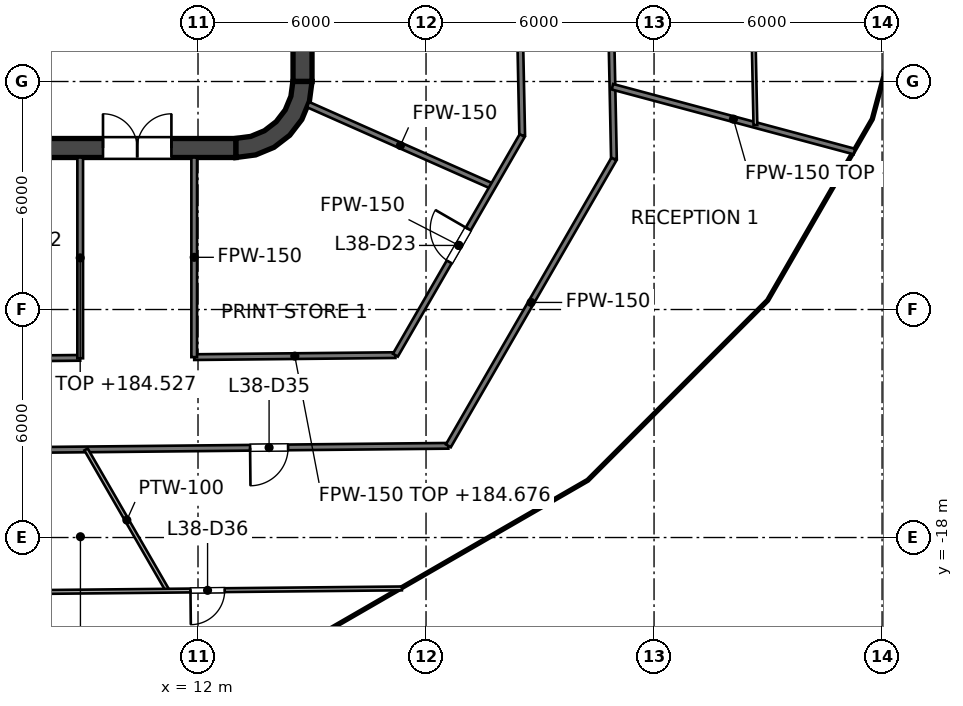
"""IFC4 building model, lengths in metres.
Left out: names, types, materials, properties, quantities, classifications, styles, units other than length and angle.
Written with IfcOpenShell. Run it as: python <this file> out.ifc"""

import sys

from ifc_helpers import new_model, si_unit, direction, frame, frame_2d, origin, place, context, subcontext, project, spatial, polyline, rectangle, outline, extrude, element, fill, save


model = new_model("IFC4")
c1 = context("Model", 3, precision=1e-05, world=origin(), true_north=direction((0.0, 1.0)))
c2 = subcontext(c1, "Body", "Model", "MODEL_VIEW")
j1 = project(units=[si_unit("LENGTHUNIT", "METRE"), si_unit("PLANEANGLEUNIT", "RADIAN")], contexts=[c1])
p1 = place(None, origin())
s1 = spatial("IfcSite", under=j1, at=p1, CompositionType="ELEMENT")
p2 = place(p1, origin())
s2 = spatial("IfcBuilding", under=s1, at=p2, CompositionType="ELEMENT")
p3 = place(p2, frame((0.0, 0.0, 181.6)))
s3 = spatial("IfcBuildingStorey", under=s2, at=p3, CompositionType="ELEMENT", Elevation=181.6)
p4 = place(p3, frame((-13.0, -7.75, 0.0), z_axis=(0.0, 0.0, 1.0), x_axis=(1.0, 0.0, 0.0)))
e1 = element("IfcWall", 1, at=p4, inside=s3, PredefinedType="SHEAR", context=c2, shape_type="SweptSolid", body=[
    extrude(rectangle(XDim=26.0, YDim=0.5, at=frame_2d((13.0, 0.0))), origin(), (0.0, 0.0, 1.0), 4.0),
])
p5 = place(p4, frame((1.7, 0.0, 0.0)))
e2 = element("IfcOpeningElement", 2, at=p5, cuts=e1, PredefinedType="OPENING", context=c2, shape_type="SweptSolid", body=[
    extrude(rectangle(XDim=1.8, YDim=2.1, at=frame_2d((0.9, 1.05))), frame((0.0, 0.25, 0.0), z_axis=(0.0, -1.0, 0.0), x_axis=(1.0, 0.0, 0.0)), (0.0, 0.0, 1.0), 0.5),
])
p6 = place(p4, frame((22.5, 0.0, 0.0)))
e3 = element("IfcOpeningElement", 3, at=p6, cuts=e1, PredefinedType="OPENING", context=c2, shape_type="SweptSolid", body=[
    extrude(rectangle(XDim=1.8, YDim=2.1, at=frame_2d((0.9, 1.05))), frame((0.0, 0.25, 0.0), z_axis=(0.0, -1.0, 0.0), x_axis=(1.0, 0.0, 0.0)), (0.0, 0.0, 1.0), 0.5),
])
p7 = place(p3, frame((14.75, -6.0, 0.0), z_axis=(0.0, 0.0, 1.0), x_axis=(0.0, 1.0, 0.0)))
e4 = element("IfcWall", 4, at=p7, inside=s3, PredefinedType="SHEAR", context=c2, shape_type="SweptSolid", body=[
    extrude(rectangle(XDim=12.0, YDim=0.5, at=frame_2d((6.0, 0.0))), origin(), (0.0, 0.0, 1.0), 4.0),
])
p8 = place(p3, origin())
e5 = element("IfcWall", 5, at=p8, inside=s3, PredefinedType="SHEAR", context=c2, shape_type="SweptSolid", body=[
    extrude(outline(polyline([(15.0, -6.0), (14.496, -6.0), (14.445, -6.387), (14.295, -6.748), (14.058, -7.058), (13.748, -7.295), (13.387, -7.445), (13.0, -7.496), (13.0, -8.0), (13.518, -7.932), (14.0, -7.732), (14.414, -7.414), (14.732, -7.0), (14.932, -6.518), (15.0, -6.0)])), origin(), (0.0, 0.0, 1.0), 4.0),
])
p9 = place(p3, frame((9.0, -6.6, 0.0), z_axis=(0.0, 0.0, 1.0), x_axis=(0.0, 1.0, 0.0)))
e6 = element("IfcWall", 6, at=p9, inside=s3, PredefinedType="SOLIDWALL", context=c2, shape_type="SweptSolid", body=[
    extrude(rectangle(XDim=2.5, YDim=0.25, at=frame_2d((1.25, 0.0))), origin(), (0.0, 0.0, 1.0), 3.85),
])
p10 = place(p9, frame((0.65, 0.0, 0.0)))
e7 = element("IfcOpeningElement", 7, at=p10, cuts=e6, PredefinedType="OPENING", context=c2, shape_type="SweptSolid", body=[
    extrude(rectangle(XDim=1.2, YDim=2.1, at=frame_2d((0.6, 1.05))), frame((0.0, 0.125, 0.0), z_axis=(0.0, -1.0, 0.0), x_axis=(1.0, 0.0, 0.0)), (0.0, 0.0, 1.0), 0.25),
])
p11 = place(p3, frame((-9.125, -7.05, 0.0), z_axis=(0.0, 0.0, 1.0), x_axis=(1.0, 0.0, 0.0)))
e8 = element("IfcWall", 8, at=p11, inside=s3, PredefinedType="SOLIDWALL", context=c2, shape_type="SweptSolid", body=[
    extrude(rectangle(XDim=18.25, YDim=0.9, at=frame_2d((9.125, 0.0))), origin(), (0.0, 0.0, 1.0), 3.85),
])
p12 = place(p3, frame((11.8, -7.5, 0.0), z_axis=(0.0, 0.0, 1.0), x_axis=(0.0, 1.0, 0.0)))
e9 = element("IfcWall", 9, at=p12, inside=s3, PredefinedType="SOLIDWALL", context=c2, shape_type="SweptSolid", body=[
    extrude(rectangle(XDim=15.0, YDim=0.4, at=frame_2d((7.5, 0.0))), origin(), (0.0, 0.0, 1.0), 3.85),
])
p13 = place(p12, frame((11.3, 0.0, 0.0)))
e10 = element("IfcOpeningElement", 10, at=p13, cuts=e9, PredefinedType="OPENING", context=c2, shape_type="SweptSolid", body=[
    extrude(rectangle(XDim=1.1, YDim=2.1, at=frame_2d((0.55, 1.05))), frame((0.0, 0.2, 0.0), z_axis=(0.0, -1.0, 0.0), x_axis=(1.0, 0.0, 0.0)), (0.0, 0.0, 1.0), 0.4),
])
p14 = place(p12, frame((8.4, 0.0, 0.0)))
e11 = element("IfcOpeningElement", 11, at=p14, cuts=e9, PredefinedType="OPENING", context=c2, shape_type="SweptSolid", body=[
    extrude(rectangle(XDim=1.1, YDim=2.1, at=frame_2d((0.55, 1.05))), frame((0.0, 0.2, 0.0), z_axis=(0.0, -1.0, 0.0), x_axis=(1.0, 0.0, 0.0)), (0.0, 0.0, 1.0), 0.4),
])
p15 = place(p12, frame((5.5, 0.0, 0.0)))
e12 = element("IfcOpeningElement", 12, at=p15, cuts=e9, PredefinedType="OPENING", context=c2, shape_type="SweptSolid", body=[
    extrude(rectangle(XDim=1.1, YDim=2.1, at=frame_2d((0.55, 1.05))), frame((0.0, 0.2, 0.0), z_axis=(0.0, -1.0, 0.0), x_axis=(1.0, 0.0, 0.0)), (0.0, 0.0, 1.0), 0.4),
])
p16 = place(p12, frame((13.697, 0.0, 0.0)))
e13 = element("IfcOpeningElement", 13, at=p16, cuts=e9, PredefinedType="OPENING", context=c2, shape_type="SweptSolid", body=[
    extrude(rectangle(XDim=0.9, YDim=2.1, at=frame_2d((0.45, 1.05))), frame((0.0, 0.2, 0.0), z_axis=(0.0, -1.0, 0.0), x_axis=(1.0, 0.0, 0.0)), (0.0, 0.0, 1.0), 0.4),
])
p17 = place(p12, frame((0.403, 0.0, 0.0)))
e14 = element("IfcOpeningElement", 14, at=p17, cuts=e9, PredefinedType="OPENING", context=c2, shape_type="SweptSolid", body=[
    extrude(rectangle(XDim=0.9, YDim=2.1, at=frame_2d((0.45, 1.05))), frame((0.0, 0.2, 0.0), z_axis=(0.0, -1.0, 0.0), x_axis=(1.0, 0.0, 0.0)), (0.0, 0.0, 1.0), 0.4),
])
e15 = element("IfcWall", 15, at=p8, inside=s3, PredefinedType="SOLIDWALL", context=c2, shape_type="SweptSolid", body=[
    extrude(outline(polyline([(12.0, -5.675), (12.0, -5.925), (14.25, -5.925), (14.5, -5.925), (14.5, -5.675), (14.5, -3.025), (14.5, -2.775), (14.5, -0.125), (14.5, 0.125), (14.5, 2.775), (14.5, 3.025), (14.5, 5.675), (14.5, 5.925), (14.25, 5.925), (12.0, 5.925), (12.0, 5.675), (14.25, 5.675), (14.25, 3.025), (12.0, 3.025), (12.0, 2.775), (14.25, 2.775), (14.25, 0.125), (12.0, 0.125), (12.0, -0.125), (14.25, -0.125), (14.25, -2.775), (12.0, -2.775), (12.0, -3.025), (14.25, -3.025), (14.25, -5.675), (12.0, -5.675)])), origin(), (0.0, 0.0, 1.0), 3.85),
])
p18 = place(p3, frame((20.167, 10.213, 0.0), z_axis=(0.0, 0.0, 1.0), x_axis=(0.020610894613, -0.999787572949, 0.0)))
e16 = element("IfcWall", 16, at=p18, inside=s3, PredefinedType="PARTITIONING", context=c2, shape_type="SweptSolid", body=[
    extrude(rectangle(XDim=17.637, YDim=0.15, at=frame_2d((8.819, 0.0))), origin(), (0.0, 0.0, 1.0), 2.927),
])
p19 = place(p18, frame((10.508, 0.0, 0.0)))
e17 = element("IfcOpeningElement", 17, at=p19, cuts=e16, PredefinedType="OPENING", context=c2, shape_type="SweptSolid", body=[
    extrude(rectangle(XDim=1.0, YDim=2.1, at=frame_2d((0.5, 1.05))), frame((0.0, 0.075, 0.0), z_axis=(0.0, -1.0, 0.0), x_axis=(1.0, 0.0, 0.0)), (0.0, 0.0, 1.0), 0.15),
])
p20 = place(p18, frame((5.09, 0.0, 0.0)))
e18 = element("IfcOpeningElement", 18, at=p20, cuts=e16, PredefinedType="OPENING", context=c2, shape_type="SweptSolid", body=[
    extrude(rectangle(XDim=1.0, YDim=2.1, at=frame_2d((0.5, 1.05))), frame((0.0, 0.075, 0.0), z_axis=(0.0, -1.0, 0.0), x_axis=(1.0, 0.0, 0.0)), (0.0, 0.0, 1.0), 0.15),
])
p21 = place(p3, frame((22.539, 11.615, 0.0), z_axis=(0.0, 0.0, 1.0), x_axis=(0.020613919434, -0.999787510587, 0.0)))
e19 = element("IfcWall", 19, at=p21, inside=s3, PredefinedType="PARTITIONING", context=c2, shape_type="SweptSolid", body=[
    extrude(rectangle(XDim=19.66, YDim=0.15, at=frame_2d((9.83, 0.0))), origin(), (0.0, 0.0, 1.0), 2.927),
])
p22 = place(p21, frame((9.33, 0.0, 0.0)))
e20 = element("IfcOpeningElement", 20, at=p22, cuts=e19, PredefinedType="OPENING", context=c2, shape_type="SweptSolid", body=[
    extrude(rectangle(XDim=1.0, YDim=2.1, at=frame_2d((0.5, 1.05))), frame((0.0, 0.075, 0.0), z_axis=(0.0, -1.0, 0.0), x_axis=(1.0, 0.0, 0.0)), (0.0, 0.0, 1.0), 0.15),
])
p23 = place(p3, frame((14.895, -6.607, 0.0), z_axis=(0.0, 0.0, 1.0), x_axis=(0.914233271379, -0.405188259337, 0.0)))
e21 = element("IfcWall", 21, at=p23, inside=s3, PredefinedType="PARTITIONING", context=c2, shape_type="SweptSolid", body=[
    extrude(rectangle(XDim=5.317, YDim=0.15, at=frame_2d((2.659, 0.0))), origin(), (0.0, 0.0, 1.0), 2.995),
])
p24 = place(p3, frame((22.905, -6.138, 0.0), z_axis=(0.0, 0.0, 1.0), x_axis=(0.965933668704, -0.258789775039, 0.0)))
e22 = element("IfcWall", 22, at=p24, inside=s3, PredefinedType="PARTITIONING", context=c2, shape_type="SweptSolid", body=[
    extrude(rectangle(XDim=6.592, YDim=0.15, at=frame_2d((3.296, 0.0))), origin(), (0.0, 0.0, 1.0), 3.527),
])
p25 = place(p3, frame((-14.534, -15.916, 0.0), z_axis=(0.0, 0.0, 1.0), x_axis=(0.999950564508, 0.009943266119, 0.0)))
e23 = element("IfcWall", 23, at=p25, inside=s3, PredefinedType="PARTITIONING", context=c2, shape_type="SweptSolid", body=[
    extrude(rectangle(XDim=33.123, YDim=0.15, at=frame_2d((16.561, 0.0))), origin(), (0.0, 0.0, 1.0), 2.927),
])
p26 = place(p25, frame((20.091, 0.0, 0.0)))
e24 = element("IfcOpeningElement", 24, at=p26, cuts=e23, PredefinedType="OPENING", context=c2, shape_type="SweptSolid", body=[
    extrude(rectangle(XDim=1.0, YDim=2.1, at=frame_2d((0.5, 1.05))), frame((0.0, 0.075, 0.0), z_axis=(0.0, -1.0, 0.0), x_axis=(1.0, 0.0, 0.0)), (0.0, 0.0, 1.0), 0.15),
])
p27 = place(p25, frame((27.906, 0.0, 0.0)))
e25 = element("IfcOpeningElement", 25, at=p27, cuts=e23, PredefinedType="OPENING", context=c2, shape_type="SweptSolid", body=[
    extrude(rectangle(XDim=1.0, YDim=2.1, at=frame_2d((0.5, 1.05))), frame((0.0, 0.075, 0.0), z_axis=(0.0, -1.0, 0.0), x_axis=(1.0, 0.0, 0.0)), (0.0, 0.0, 1.0), 0.15),
])
p28 = place(p25, frame((8.214, 0.0, 0.0)))
e26 = element("IfcOpeningElement", 26, at=p28, cuts=e23, PredefinedType="OPENING", context=c2, shape_type="SweptSolid", body=[
    extrude(rectangle(XDim=1.0, YDim=2.1, at=frame_2d((0.5, 1.05))), frame((0.0, 0.075, 0.0), z_axis=(0.0, -1.0, 0.0), x_axis=(1.0, 0.0, 0.0)), (0.0, 0.0, 1.0), 0.15),
])
p29 = place(p3, frame((-8.9, -13.449, 0.0), z_axis=(0.0, 0.0, 1.0), x_axis=(0.99995056171, 0.009943547447, 0.0)))
e27 = element("IfcWall", 27, at=p29, inside=s3, PredefinedType="PARTITIONING", context=c2, shape_type="SweptSolid", body=[
    extrude(rectangle(XDim=17.801, YDim=0.15, at=frame_2d((8.9, 0.0))), origin(), (0.0, 0.0, 1.0), 2.927),
])
p30 = place(p29, frame((3.818, 0.0, 0.0)))
e28 = element("IfcOpeningElement", 28, at=p30, cuts=e27, PredefinedType="OPENING", context=c2, shape_type="SweptSolid", body=[
    extrude(rectangle(XDim=1.0, YDim=2.1, at=frame_2d((0.5, 1.05))), frame((0.0, 0.075, 0.0), z_axis=(0.0, -1.0, 0.0), x_axis=(1.0, 0.0, 0.0)), (0.0, 0.0, 1.0), 0.15),
])
p31 = place(p29, frame((8.391, 0.0, 0.0)))
e29 = element("IfcOpeningElement", 29, at=p31, cuts=e27, PredefinedType="OPENING", context=c2, shape_type="SweptSolid", body=[
    extrude(rectangle(XDim=1.0, YDim=2.1, at=frame_2d((0.5, 1.05))), frame((0.0, 0.075, 0.0), z_axis=(0.0, -1.0, 0.0), x_axis=(1.0, 0.0, 0.0)), (0.0, 0.0, 1.0), 0.15),
])
p32 = place(p29, frame((12.975, 0.0, 0.0)))
e30 = element("IfcOpeningElement", 30, at=p32, cuts=e27, PredefinedType="OPENING", context=c2, shape_type="SweptSolid", body=[
    extrude(rectangle(XDim=1.0, YDim=2.1, at=frame_2d((0.5, 1.05))), frame((0.0, 0.075, 0.0), z_axis=(0.0, -1.0, 0.0), x_axis=(1.0, 0.0, 0.0)), (0.0, 0.0, 1.0), 0.15),
])
p33 = place(p3, frame((11.9, -13.253, 0.0), z_axis=(0.0, 0.0, 1.0), x_axis=(0.999950853109, 0.009914200296, 0.0)))
e31 = element("IfcWall", 31, at=p33, inside=s3, PredefinedType="PARTITIONING", context=c2, shape_type="SweptSolid", body=[
    extrude(rectangle(XDim=5.294, YDim=0.15, at=frame_2d((2.647, 0.0))), origin(), (0.0, 0.0, 1.0), 3.076),
])
p34 = place(p3, frame((18.587, -15.587, 0.0), z_axis=(0.0, 0.0, 1.0), x_axis=(0.499993286632, 0.866029279715, 0.0)))
e32 = element("IfcWall", 32, at=p34, inside=s3, PredefinedType="PARTITIONING", context=c2, shape_type="SweptSolid", body=[
    extrude(rectangle(XDim=8.713, YDim=0.15, at=frame_2d((4.357, 0.0))), origin(), (0.0, 0.0, 1.0), 2.995),
])
p35 = place(p3, frame((17.194, -13.201, 0.0), z_axis=(0.0, 0.0, 1.0), x_axis=(0.499983182885, 0.866035112932, 0.0)))
e33 = element("IfcWall", 33, at=p35, inside=s3, PredefinedType="PARTITIONING", context=c2, shape_type="SweptSolid", body=[
    extrude(rectangle(XDim=6.674, YDim=0.15, at=frame_2d((3.337, 0.0))), origin(), (0.0, 0.0, 1.0), 2.995),
])
p36 = place(p35, frame((2.834, 0.0, 0.0)))
e34 = element("IfcOpeningElement", 34, at=p36, cuts=e33, PredefinedType="OPENING", context=c2, shape_type="SweptSolid", body=[
    extrude(rectangle(XDim=1.0, YDim=2.1, at=frame_2d((0.5, 1.05))), frame((0.0, 0.075, 0.0), z_axis=(0.0, -1.0, 0.0), x_axis=(1.0, 0.0, 0.0)), (0.0, 0.0, 1.0), 0.15),
])
p37 = place(p3, frame((11.9, -13.253, 0.0), z_axis=(0.0, 0.0, 1.0), x_axis=(0.0, 1.0, 0.0)))
e35 = element("IfcWall", 35, at=p37, inside=s3, PredefinedType="PARTITIONING", context=c2, shape_type="SweptSolid", body=[
    extrude(rectangle(XDim=5.253, YDim=0.15, at=frame_2d((2.626, 0.0))), origin(), (0.0, 0.0, 1.0), 2.995),
])
p38 = place(p3, frame((8.9, -13.283, 0.0), z_axis=(0.0, 0.0, 1.0), x_axis=(0.0, 1.0, 0.0)))
e36 = element("IfcWall", 36, at=p38, inside=s3, PredefinedType="PARTITIONING", context=c2, shape_type="SweptSolid", body=[
    extrude(rectangle(XDim=5.283, YDim=0.15, at=frame_2d((2.642, 0.0))), origin(), (0.0, 0.0, 1.0), 2.927),
])
p39 = place(p3, frame((26.261, 12.516, 0.0), z_axis=(0.0, 0.0, 1.0), x_axis=(0.020644749829, -0.999786874441, 0.0)))
e37 = element("IfcWall", 37, at=p39, inside=s3, PredefinedType="PARTITIONING", context=c2, shape_type="SweptSolid", body=[
    extrude(rectangle(XDim=19.666, YDim=0.1, at=frame_2d((9.833, 0.0))), origin(), (0.0, 0.0, 1.0), 2.927),
])
p40 = place(p39, frame((9.433, 0.0, 0.0)))
e38 = element("IfcOpeningElement", 38, at=p40, cuts=e37, PredefinedType="OPENING", context=c2, shape_type="SweptSolid", body=[
    extrude(rectangle(XDim=0.9, YDim=2.1, at=frame_2d((0.45, 1.05))), frame((0.0, 0.05, 0.0), z_axis=(0.0, -1.0, 0.0), x_axis=(1.0, 0.0, 0.0)), (0.0, 0.0, 1.0), 0.1),
])
p41 = place(p3, frame((9.054, -15.682, 0.0), z_axis=(0.0, 0.0, 1.0), x_axis=(0.499966883342, -0.866044522851, 0.0)))
e39 = element("IfcWall", 39, at=p41, inside=s3, PredefinedType="PARTITIONING", context=c2, shape_type="SweptSolid", body=[
    extrude(rectangle(XDim=4.294, YDim=0.1, at=frame_2d((2.147, 0.0))), origin(), (0.0, 0.0, 1.0), 3.85),
])
p42 = place(p3, frame((-15.26, -19.663, 0.0), z_axis=(0.0, 0.0, 1.0), x_axis=(0.999950698652, 0.009929766651, 0.0)))
e40 = element("IfcWall", 40, at=p42, inside=s3, PredefinedType="PARTITIONING", context=c2, shape_type="SweptSolid", body=[
    extrude(rectangle(XDim=32.627, YDim=0.1, at=frame_2d((16.313, 0.0))), origin(), (0.0, 0.0, 1.0), 2.927),
])
p43 = place(p42, frame((27.063, 0.0, 0.0)))
e41 = element("IfcOpeningElement", 41, at=p43, cuts=e40, PredefinedType="OPENING", context=c2, shape_type="SweptSolid", body=[
    extrude(rectangle(XDim=0.9, YDim=2.1, at=frame_2d((0.45, 1.05))), frame((0.0, 0.05, 0.0), z_axis=(0.0, -1.0, 0.0), x_axis=(1.0, 0.0, 0.0)), (0.0, 0.0, 1.0), 0.1),
])
p44 = place(p42, frame((7.131, 0.0, 0.0)))
e42 = element("IfcOpeningElement", 42, at=p44, cuts=e40, PredefinedType="OPENING", context=c2, shape_type="SweptSolid", body=[
    extrude(rectangle(XDim=0.9, YDim=2.1, at=frame_2d((0.45, 1.05))), frame((0.0, 0.05, 0.0), z_axis=(0.0, -1.0, 0.0), x_axis=(1.0, 0.0, 0.0)), (0.0, 0.0, 1.0), 0.1),
])
p45 = place(p10, origin())
e43 = element("IfcDoor", 43, at=p45, inside=s3, OperationType="SINGLE_SWING_LEFT", PredefinedType="DOOR", context=c2, shape_type="SweptSolid", body=[
    extrude(rectangle(XDim=1.2, YDim=2.1, at=frame_2d((0.6, 1.05))), frame((0.0, 0.025, 0.0), z_axis=(0.0, -1.0, 0.0), x_axis=(1.0, 0.0, 0.0)), (0.0, 0.0, 1.0), 0.05),
])
fill(e7, e43)
p46 = place(p17, origin())
e44 = element("IfcDoor", 44, at=p46, inside=s3, OperationType="SINGLE_SWING_RIGHT", PredefinedType="DOOR", context=c2, shape_type="SweptSolid", body=[
    extrude(rectangle(XDim=0.9, YDim=2.1, at=frame_2d((0.45, 1.05))), frame((0.0, 0.025, 0.0), z_axis=(0.0, -1.0, 0.0), x_axis=(1.0, 0.0, 0.0)), (0.0, 0.0, 1.0), 0.05),
])
fill(e14, e44)
p47 = place(p6, origin())
e45 = element("IfcDoor", 45, at=p47, inside=s3, OperationType="DOUBLE_DOOR_SINGLE_SWING", PredefinedType="DOOR", context=c2, shape_type="SweptSolid", body=[
    extrude(rectangle(XDim=1.8, YDim=2.1, at=frame_2d((0.9, 1.05))), frame((0.0, 0.025, 0.0), z_axis=(0.0, -1.0, 0.0), x_axis=(1.0, 0.0, 0.0)), (0.0, 0.0, 1.0), 0.05),
])
fill(e3, e45)
p48 = place(p36, origin())
e46 = element("IfcDoor", 46, at=p48, inside=s3, OperationType="SINGLE_SWING_RIGHT", PredefinedType="DOOR", context=c2, shape_type="SweptSolid", body=[
    extrude(rectangle(XDim=1.0, YDim=2.1, at=frame_2d((0.5, 1.05))), frame((0.0, 0.025, 0.0), z_axis=(0.0, -1.0, 0.0), x_axis=(1.0, 0.0, 0.0)), (0.0, 0.0, 1.0), 0.05),
])
fill(e34, e46)
p49 = place(p27, origin())
e47 = element("IfcDoor", 47, at=p49, inside=s3, OperationType="SINGLE_SWING_LEFT", PredefinedType="DOOR", context=c2, shape_type="SweptSolid", body=[
    extrude(rectangle(XDim=1.0, YDim=2.1, at=frame_2d((0.5, 1.05))), frame((0.0, 0.025, 0.0), z_axis=(0.0, -1.0, 0.0), x_axis=(1.0, 0.0, 0.0)), (0.0, 0.0, 1.0), 0.05),
])
fill(e25, e47)
p50 = place(p43, origin())
e48 = element("IfcDoor", 48, at=p50, inside=s3, OperationType="SINGLE_SWING_LEFT", PredefinedType="DOOR", context=c2, shape_type="SweptSolid", body=[
    extrude(rectangle(XDim=0.9, YDim=2.1, at=frame_2d((0.45, 1.05))), frame((0.0, 0.025, 0.0), z_axis=(0.0, -1.0, 0.0), x_axis=(1.0, 0.0, 0.0)), (0.0, 0.0, 1.0), 0.05),
])
fill(e41, e48)
save(model, sys.argv[1])
